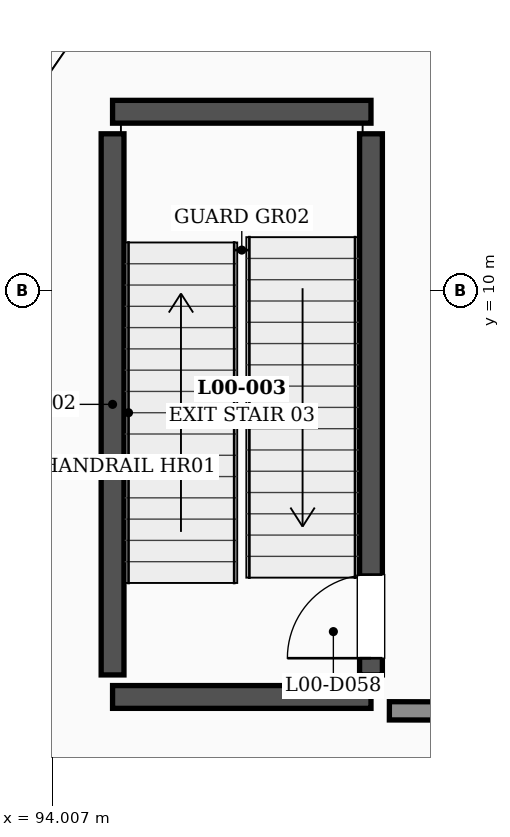
"""IFC4 building model, lengths in metres.
Left out: names, types, materials, properties, quantities, classifications, styles, units other than length and angle.
Written with IfcOpenShell. Run it as: python <this file> out.ifc"""

import sys

from ifc_helpers import new_model, si_unit, direction, frame, frame_2d, origin, place, context, subcontext, project, spatial, rectangle, extrude, element, fill, save


model = new_model("IFC4")
c1 = context("Model", 3, precision=1e-05, world=origin(), true_north=direction((0.0, 1.0)))
c2 = subcontext(c1, "Body", "Model", "MODEL_VIEW")
j1 = project(units=[si_unit("LENGTHUNIT", "METRE"), si_unit("PLANEANGLEUNIT", "RADIAN")], contexts=[c1])
p1 = place(None, origin())
s1 = spatial("IfcSite", under=j1, at=p1, CompositionType="ELEMENT")
p2 = place(p1, origin())
s2 = spatial("IfcBuilding", under=s1, at=p2, CompositionType="ELEMENT")
p3 = place(p2, origin())
s3 = spatial("IfcBuildingStorey", under=s2, at=p3, CompositionType="ELEMENT", Elevation=0.0)
p4 = place(p3, frame((88.678, 4.697, 0.0), z_axis=(0.0, 0.0, 1.0), x_axis=(0.95182847269, -0.30663098111, 0.0)))
e1 = element("IfcWall", 1, at=p4, inside=s3, PredefinedType="SOLIDWALL", context=c2, shape_type="SweptSolid", body=[
    extrude(rectangle(XDim=9.785, YDim=0.34, at=frame_2d((4.893, 0.0))), origin(), (0.0, 0.0, 1.0), 4.83),
])
p5 = place(p4, frame((0.9, 0.0, 1.05)))
e2 = element("IfcOpeningElement", 2, at=p5, cuts=e1, PredefinedType="OPENING", context=c2, shape_type="SweptSolid", body=[
    extrude(rectangle(XDim=2.8, YDim=2.4, at=frame_2d((1.4, 1.2))), frame((0.0, 0.18, 0.0), z_axis=(0.0, -1.0, 0.0), x_axis=(1.0, 0.0, 0.0)), (0.0, 0.0, 1.0), 0.36),
])
p6 = place(p4, frame((6.085, 0.0, 1.05)))
e3 = element("IfcOpeningElement", 3, at=p6, cuts=e1, PredefinedType="OPENING", context=c2, shape_type="SweptSolid", body=[
    extrude(rectangle(XDim=2.8, YDim=2.4, at=frame_2d((1.4, 1.2))), frame((0.0, 0.18, 0.0), z_axis=(0.0, -1.0, 0.0), x_axis=(1.0, 0.0, 0.0)), (0.0, 0.0, 1.0), 0.36),
])
for number, where, z_axis, x_axis in (
    (4, (94.8, 4.65, 0.0), (0.0, 0.0, 1.0), (1.0, 0.0, 0.0)),
    (5, (94.8, 12.35, 0.0), (0.0, 0.0, 1.0), (1.0, 0.0, 0.0)),
):
    element("IfcWall", number, at=place(p3, frame(where, z_axis=z_axis, x_axis=x_axis)), inside=s3, PredefinedType="SHEAR", context=c2, shape_type="SweptSolid", body=[
        extrude(rectangle(XDim=3.4, YDim=0.3, at=frame_2d((1.7, 0.0))), origin(), (0.0, 0.0, 1.0), 6.0),
    ])
p7 = place(p3, frame((94.8, 4.94, 0.0), z_axis=(0.0, 0.0, 1.0), x_axis=(0.0, 1.0, 0.0)))
e6 = element("IfcWall", 6, at=p7, inside=s3, PredefinedType="SHEAR", context=c2, shape_type="SweptSolid", body=[
    extrude(rectangle(XDim=7.12, YDim=0.3, at=frame_2d((3.56, 0.0))), origin(), (0.0, 0.0, 1.0), 6.0),
])
p8 = place(p3, frame((98.2, 4.94, 0.0), z_axis=(0.0, 0.0, 1.0), x_axis=(0.0, 1.0, 0.0)))
e7 = element("IfcWall", 7, at=p8, inside=s3, PredefinedType="SHEAR", context=c2, shape_type="SweptSolid", body=[
    extrude(rectangle(XDim=7.12, YDim=0.3, at=frame_2d((3.56, 0.0))), origin(), (0.0, 0.0, 1.0), 6.0),
])
p9 = place(p8, frame((0.22, 0.0, 0.0)))
e8 = element("IfcOpeningElement", 8, at=p9, cuts=e7, PredefinedType="OPENING", context=c2, shape_type="SweptSolid", body=[
    extrude(rectangle(XDim=1.1, YDim=2.2, at=frame_2d((0.55, 1.1))), frame((0.0, 0.16, 0.0), z_axis=(0.0, -1.0, 0.0), x_axis=(1.0, 0.0, 0.0)), (0.0, 0.0, 1.0), 0.32),
])
p10 = place(p3, frame((98.442, 4.468, 0.0), z_axis=(0.0, 0.0, 1.0), x_axis=(0.999998244085, -0.001873987016, 0.0)))
e9 = element("IfcWall", 9, at=p10, inside=s3, PredefinedType="PARTITIONING", context=c2, shape_type="SweptSolid", body=[
    extrude(rectangle(XDim=3.778, YDim=0.24, at=frame_2d((1.889, 0.0))), origin(), (0.0, 0.0, 1.0), 4.78),
])
p11 = place(p9, origin())
e10 = element("IfcDoor", 10, at=p11, inside=s3, OperationType="SINGLE_SWING_LEFT", PredefinedType="DOOR", context=c2, shape_type="SweptSolid", body=[
    extrude(rectangle(XDim=1.1, YDim=2.2, at=frame_2d((0.55, 1.1))), frame((0.0, 0.025, 0.0), z_axis=(0.0, -1.0, 0.0), x_axis=(1.0, 0.0, 0.0)), (0.0, 0.0, 1.0), 0.05),
])
fill(e8, e10)
save(model, sys.argv[1])
